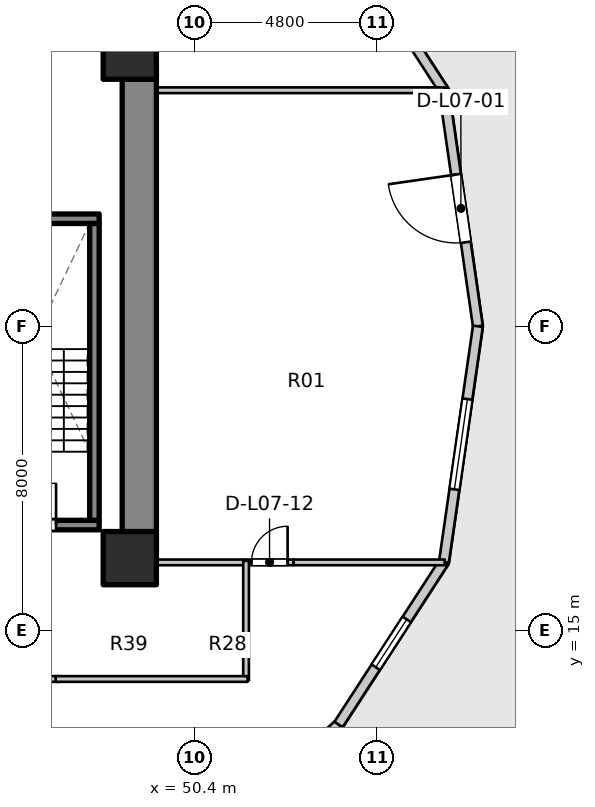
"""IFC4 building model, lengths in metres.
Left out: names, types, materials, properties, quantities, classifications, styles, units other than length and angle.
Written with IfcOpenShell. Run it as: python <this file> out.ifc"""

import sys

from ifc_helpers import new_model, si_unit, direction, frame, frame_2d, origin, origin_2d, place, context, subcontext, project, spatial, rectangle, extrude, element, fill, save


model = new_model("IFC4")
c1 = context("Model", 3, precision=1e-05, world=origin(), true_north=direction((0.0, 1.0)))
c2 = subcontext(c1, "Body", "Model", "MODEL_VIEW")
j1 = project(units=[si_unit("LENGTHUNIT", "METRE"), si_unit("PLANEANGLEUNIT", "RADIAN")], contexts=[c1])
p1 = place(None, origin())
s1 = spatial("IfcSite", under=j1, at=p1, CompositionType="ELEMENT")
p2 = place(p1, origin())
s2 = spatial("IfcBuilding", under=s1, at=p2, CompositionType="ELEMENT")
p3 = place(p2, frame((0.0, 0.0, 27.6)))
s3 = spatial("IfcBuildingStorey", under=s2, at=p3, CompositionType="ELEMENT", Elevation=27.6)
p4 = place(p3, frame((48.95, 17.05, 0.0), z_axis=(0.0, 0.0, 1.0), x_axis=(0.0, 1.0, 0.0)))
e1 = element("IfcWall", 1, at=p4, inside=s3, PredefinedType="SHEAR", context=c2, shape_type="SweptSolid", body=[
    extrude(rectangle(XDim=12.8, YDim=0.9, at=frame_2d((6.4, 0.0))), origin(), (0.0, 0.0, 1.0), 3.1),
])
p5 = place(p3, frame((44.525, 17.77, 0.0), z_axis=(0.0, 0.0, 1.0), x_axis=(1.0, 0.0, 0.0)))
e2 = element("IfcWall", 2, at=p5, inside=s3, PredefinedType="SOLIDWALL", context=c2, shape_type="SweptSolid", body=[
    extrude(rectangle(XDim=3.37, YDim=0.25, at=frame_2d((1.685, 0.0))), origin(), (0.0, 0.0, 1.0), 3.1),
])
p6 = place(p5, frame((1.135, 0.0, 0.0)))
e3 = element("IfcOpeningElement", 3, at=p6, cuts=e2, PredefinedType="OPENING", context=c2, shape_type="SweptSolid", body=[
    extrude(rectangle(XDim=1.1, YDim=2.1, at=frame_2d((0.55, 1.05))), frame((0.0, 0.135, 0.0), z_axis=(0.0, -1.0, 0.0), x_axis=(1.0, 0.0, 0.0)), (0.0, 0.0, 1.0), 0.27),
])
p7 = place(p3, frame((44.525, 25.83, 0.0), z_axis=(0.0, 0.0, 1.0), x_axis=(1.0, 0.0, 0.0)))
e4 = element("IfcWall", 4, at=p7, inside=s3, PredefinedType="SOLIDWALL", context=c2, shape_type="SweptSolid", body=[
    extrude(rectangle(XDim=3.37, YDim=0.25, at=frame_2d((1.685, 0.0))), origin(), (0.0, 0.0, 1.0), 3.1),
])
p8 = place(p3, frame((47.77, 17.895, 0.0), z_axis=(0.0, 0.0, 1.0), x_axis=(0.0, 1.0, 0.0)))
e5 = element("IfcWall", 5, at=p8, inside=s3, PredefinedType="SOLIDWALL", context=c2, shape_type="SweptSolid", body=[
    extrude(rectangle(XDim=7.81, YDim=0.25, at=frame_2d((3.905, 0.0))), origin(), (0.0, 0.0, 1.0), 3.1),
])
for number, where, z_axis, x_axis in (
    (6, (48.7, 16.9, 0.0), (0.0, 0.0, 1.0), (1.0, 0.0, 0.0)),
    (7, (48.7, 30.2, 0.0), (0.0, 0.0, 1.0), (1.0, 0.0, 0.0)),
):
    element("IfcColumn", number, at=place(p3, frame(where, z_axis=z_axis, x_axis=x_axis)), inside=s3, PredefinedType="COLUMN", context=c2, shape_type="SweptSolid", body=[
        extrude(rectangle(XDim=1.4, YDim=1.4, at=origin_2d()), origin(), (0.0, 0.0, 1.0), 3.1),
    ])
p9 = place(p3, frame((57.86, 23.0, 0.0), z_axis=(0.0, 0.0, 1.0), x_axis=(-0.142528001686, 0.989790770181, 0.0)))
e8 = element("IfcWall", 8, at=p9, inside=s3, PredefinedType="STANDARD", context=c2, shape_type="SweptSolid", body=[
    extrude(rectangle(XDim=6.269, YDim=0.26, at=frame_2d((3.135, 0.0))), origin(), (0.0, 0.0, 1.0), 2.88),
])
p10 = place(p9, frame((2.235, 0.0, 0.0)))
e9 = element("IfcOpeningElement", 9, at=p10, cuts=e8, PredefinedType="OPENING", context=c2, shape_type="SweptSolid", body=[
    extrude(rectangle(XDim=1.8, YDim=2.35, at=frame_2d((0.9, 1.175))), frame((0.0, 0.14, 0.0), z_axis=(0.0, -1.0, 0.0), x_axis=(1.0, 0.0, 0.0)), (0.0, 0.0, 1.0), 0.28),
])
p11 = place(p3, frame((56.967, 29.205, 0.0), z_axis=(0.0, 0.0, 1.0), x_axis=(-0.544578722263, 0.838709732421, 0.0)))
e10 = element("IfcWall", 10, at=p11, inside=s3, PredefinedType="STANDARD", context=c2, shape_type="SweptSolid", body=[
    extrude(rectangle(XDim=5.092, YDim=0.26, at=frame_2d((2.546, 0.0))), origin(), (0.0, 0.0, 1.0), 2.85),
])
p12 = place(p11, frame((1.796, 0.0, 0.75)))
e11 = element("IfcOpeningElement", 11, at=p12, cuts=e10, PredefinedType="OPENING", context=c2, shape_type="SweptSolid", body=[
    extrude(rectangle(XDim=1.5, YDim=1.6, at=frame_2d((0.75, 0.8))), frame((0.0, 0.14, 0.0), z_axis=(0.0, -1.0, 0.0), x_axis=(1.0, 0.0, 0.0)), (0.0, 0.0, 1.0), 0.28),
])
p13 = place(p3, frame((50.405, 9.035, 0.0), z_axis=(0.0, 0.0, 1.0), x_axis=(0.735655109293, 0.67735630223, 0.0)))
e12 = element("IfcWall", 12, at=p13, inside=s3, PredefinedType="STANDARD", context=c2, shape_type="SweptSolid", body=[
    extrude(rectangle(XDim=5.151, YDim=0.26, at=frame_2d((2.575, 0.0))), origin(), (0.0, 0.0, 1.0), 2.85),
])
p14 = place(p13, frame((1.825, 0.0, 0.75)))
e13 = element("IfcOpeningElement", 13, at=p14, cuts=e12, PredefinedType="OPENING", context=c2, shape_type="SweptSolid", body=[
    extrude(rectangle(XDim=1.5, YDim=1.6, at=frame_2d((0.75, 0.8))), frame((0.0, 0.14, 0.0), z_axis=(0.0, -1.0, 0.0), x_axis=(1.0, 0.0, 0.0)), (0.0, 0.0, 1.0), 0.28),
])
p15 = place(p3, frame((54.194, 12.524, 0.0), z_axis=(0.0, 0.0, 1.0), x_axis=(0.544578722263, 0.838709732421, 0.0)))
e14 = element("IfcWall", 14, at=p15, inside=s3, PredefinedType="STANDARD", context=c2, shape_type="SweptSolid", body=[
    extrude(rectangle(XDim=5.092, YDim=0.26, at=frame_2d((2.546, 0.0))), origin(), (0.0, 0.0, 1.0), 2.85),
])
p16 = place(p15, frame((1.796, 0.0, 0.75)))
e15 = element("IfcOpeningElement", 15, at=p16, cuts=e14, PredefinedType="OPENING", context=c2, shape_type="SweptSolid", body=[
    extrude(rectangle(XDim=1.5, YDim=1.6, at=frame_2d((0.75, 0.8))), frame((0.0, 0.14, 0.0), z_axis=(0.0, -1.0, 0.0), x_axis=(1.0, 0.0, 0.0)), (0.0, 0.0, 1.0), 0.28),
])
p17 = place(p3, frame((56.967, 16.795, 0.0), z_axis=(0.0, 0.0, 1.0), x_axis=(0.142528001686, 0.989790770181, 0.0)))
e16 = element("IfcWall", 16, at=p17, inside=s3, PredefinedType="STANDARD", context=c2, shape_type="SweptSolid", body=[
    extrude(rectangle(XDim=6.269, YDim=0.26, at=frame_2d((3.135, 0.0))), origin(), (0.0, 0.0, 1.0), 2.85),
])
p18 = place(p17, frame((1.935, 0.0, 0.75)))
e17 = element("IfcOpeningElement", 17, at=p18, cuts=e16, PredefinedType="OPENING", context=c2, shape_type="SweptSolid", body=[
    extrude(rectangle(XDim=2.4, YDim=1.7, at=frame_2d((1.2, 0.85))), frame((0.0, 0.14, 0.0), z_axis=(0.0, -1.0, 0.0), x_axis=(1.0, 0.0, 0.0)), (0.0, 0.0, 1.0), 0.28),
])
p19 = place(p3, frame((48.95, 16.788, 0.0), z_axis=(0.0, 0.0, 1.0), x_axis=(1.0, 0.0, 0.0)))
e18 = element("IfcWall", 18, at=p19, inside=s3, PredefinedType="PARTITIONING", context=c2, shape_type="SweptSolid", body=[
    extrude(rectangle(XDim=2.793, YDim=0.15, at=frame_2d((1.396, 0.0))), origin(), (0.0, 0.0, 1.0), 2.069),
])
p20 = place(p3, frame((51.743, 16.788, 0.0), z_axis=(0.0, 0.0, 1.0), x_axis=(1.0, 0.0, 0.0)))
e19 = element("IfcWall", 19, at=p20, inside=s3, PredefinedType="PARTITIONING", context=c2, shape_type="SweptSolid", body=[
    extrude(rectangle(XDim=1.27, YDim=0.15, at=frame_2d((0.635, 0.0))), origin(), (0.0, 0.0, 1.0), 2.855),
])
p21 = place(p20, frame((0.16, 0.0, 0.0)))
e20 = element("IfcOpeningElement", 20, at=p21, cuts=e19, PredefinedType="OPENING", context=c2, shape_type="SweptSolid", body=[
    extrude(rectangle(XDim=0.95, YDim=2.1, at=frame_2d((0.475, 1.05))), frame((0.0, 0.085, 0.0), z_axis=(0.0, -1.0, 0.0), x_axis=(1.0, 0.0, 0.0)), (0.0, 0.0, 1.0), 0.17),
])
p22 = place(p3, frame((53.013, 16.788, 0.0), z_axis=(0.0, 0.0, 1.0), x_axis=(1.0, 0.0, 0.0)))
e21 = element("IfcWall", 21, at=p22, inside=s3, PredefinedType="PARTITIONING", context=c2, shape_type="SweptSolid", body=[
    extrude(rectangle(XDim=3.973, YDim=0.15, at=frame_2d((1.987, 0.0))), origin(), (0.0, 0.0, 1.0), 2.855),
])
p23 = place(p3, frame((48.95, 29.212, 0.0), z_axis=(0.0, 0.0, 1.0), x_axis=(1.0, 0.0, 0.0)))
e22 = element("IfcWall", 22, at=p23, inside=s3, PredefinedType="PARTITIONING", context=c2, shape_type="SweptSolid", body=[
    extrude(rectangle(XDim=8.036, YDim=0.15, at=frame_2d((4.018, 0.0))), origin(), (0.0, 0.0, 1.0), 2.855),
])
p24 = place(p3, frame((48.95, 29.8, 0.0), z_axis=(0.0, 0.0, 1.0), x_axis=(0.0, 1.0, 0.0)))
e23 = element("IfcWall", 23, at=p24, inside=s3, PredefinedType="PARTITIONING", context=c2, shape_type="SweptSolid", body=[
    extrude(rectangle(XDim=1.29, YDim=0.15, at=frame_2d((0.645, 0.0))), origin(), (0.0, 0.0, 1.0), 2.069),
])
p25 = place(p3, frame((51.76, 13.68, 0.0), z_axis=(0.0, 0.0, 1.0), x_axis=(0.0, 1.0, 0.0)))
e24 = element("IfcWall", 24, at=p25, inside=s3, PredefinedType="PARTITIONING", context=c2, shape_type="SweptSolid", body=[
    extrude(rectangle(XDim=3.148, YDim=0.15, at=frame_2d((1.574, 0.0))), origin(), (0.0, 0.0, 1.0), 2.855),
])
p26 = place(p3, frame((39.33, 13.72, 0.0), z_axis=(0.0, 0.0, 1.0), x_axis=(1.0, 0.0, 0.0)))
e25 = element("IfcWall", 25, at=p26, inside=s3, PredefinedType="PARTITIONING", context=c2, shape_type="SweptSolid", body=[
    extrude(rectangle(XDim=7.52, YDim=0.15, at=frame_2d((3.76, 0.0))), origin(), (0.0, 0.0, 1.0), 2.237),
])
p27 = place(p26, frame((5.22, 0.0, 0.0)))
e26 = element("IfcOpeningElement", 26, at=p27, cuts=e25, PredefinedType="OPENING", context=c2, shape_type="SweptSolid", body=[
    extrude(rectangle(XDim=0.9, YDim=2.1, at=frame_2d((0.45, 1.05))), frame((0.0, 0.085, 0.0), z_axis=(0.0, -1.0, 0.0), x_axis=(1.0, 0.0, 0.0)), (0.0, 0.0, 1.0), 0.17),
])
p28 = place(p3, frame((46.75, 13.72, 0.0), z_axis=(0.0, 0.0, 1.0), x_axis=(1.0, 0.0, 0.0)))
e27 = element("IfcWall", 27, at=p28, inside=s3, PredefinedType="PARTITIONING", context=c2, shape_type="SweptSolid", body=[
    extrude(rectangle(XDim=5.05, YDim=0.15, at=frame_2d((2.525, 0.0))), origin(), (0.0, 0.0, 1.0), 2.069),
])
p29 = place(p10, origin())
e28 = element("IfcDoor", 28, at=p29, inside=s3, OperationType="SINGLE_SWING_RIGHT", PredefinedType="DOOR", context=c2, shape_type="SweptSolid", body=[
    extrude(rectangle(XDim=1.8, YDim=2.35, at=frame_2d((0.9, 1.175))), frame((0.0, 0.025, 0.0), z_axis=(0.0, -1.0, 0.0), x_axis=(1.0, 0.0, 0.0)), (0.0, 0.0, 1.0), 0.05),
])
fill(e9, e28)
p30 = place(p16, origin())
e29 = element("IfcWindow", 29, at=p30, inside=s3, PartitioningType="SINGLE_PANEL", PredefinedType="WINDOW", context=c2, shape_type="SweptSolid", body=[
    extrude(rectangle(XDim=1.5, YDim=1.6, at=frame_2d((0.75, 0.8))), frame((0.0, 0.03, 0.0), z_axis=(0.0, -1.0, 0.0), x_axis=(1.0, 0.0, 0.0)), (0.0, 0.0, 1.0), 0.06),
])
fill(e15, e29)
p31 = place(p18, origin())
e30 = element("IfcWindow", 30, at=p31, inside=s3, PartitioningType="SINGLE_PANEL", PredefinedType="WINDOW", context=c2, shape_type="SweptSolid", body=[
    extrude(rectangle(XDim=2.4, YDim=1.7, at=frame_2d((1.2, 0.85))), frame((0.0, 0.03, 0.0), z_axis=(0.0, -1.0, 0.0), x_axis=(1.0, 0.0, 0.0)), (0.0, 0.0, 1.0), 0.06),
])
fill(e17, e30)
p32 = place(p6, origin())
e31 = element("IfcDoor", 31, at=p32, inside=s3, OperationType="SINGLE_SWING_RIGHT", PredefinedType="DOOR", context=c2, shape_type="SweptSolid", body=[
    extrude(rectangle(XDim=1.1, YDim=2.1, at=frame_2d((0.55, 1.05))), frame((0.0, 0.025, 0.0), z_axis=(0.0, -1.0, 0.0), x_axis=(1.0, 0.0, 0.0)), (0.0, 0.0, 1.0), 0.05),
])
fill(e3, e31)
p33 = place(p21, origin())
e32 = element("IfcDoor", 32, at=p33, inside=s3, OperationType="SINGLE_SWING_RIGHT", PredefinedType="DOOR", context=c2, shape_type="SweptSolid", body=[
    extrude(rectangle(XDim=0.95, YDim=2.1, at=frame_2d((0.475, 1.05))), frame((0.0, 0.025, 0.0), z_axis=(0.0, -1.0, 0.0), x_axis=(1.0, 0.0, 0.0)), (0.0, 0.0, 1.0), 0.05),
])
fill(e20, e32)
save(model, sys.argv[1])
